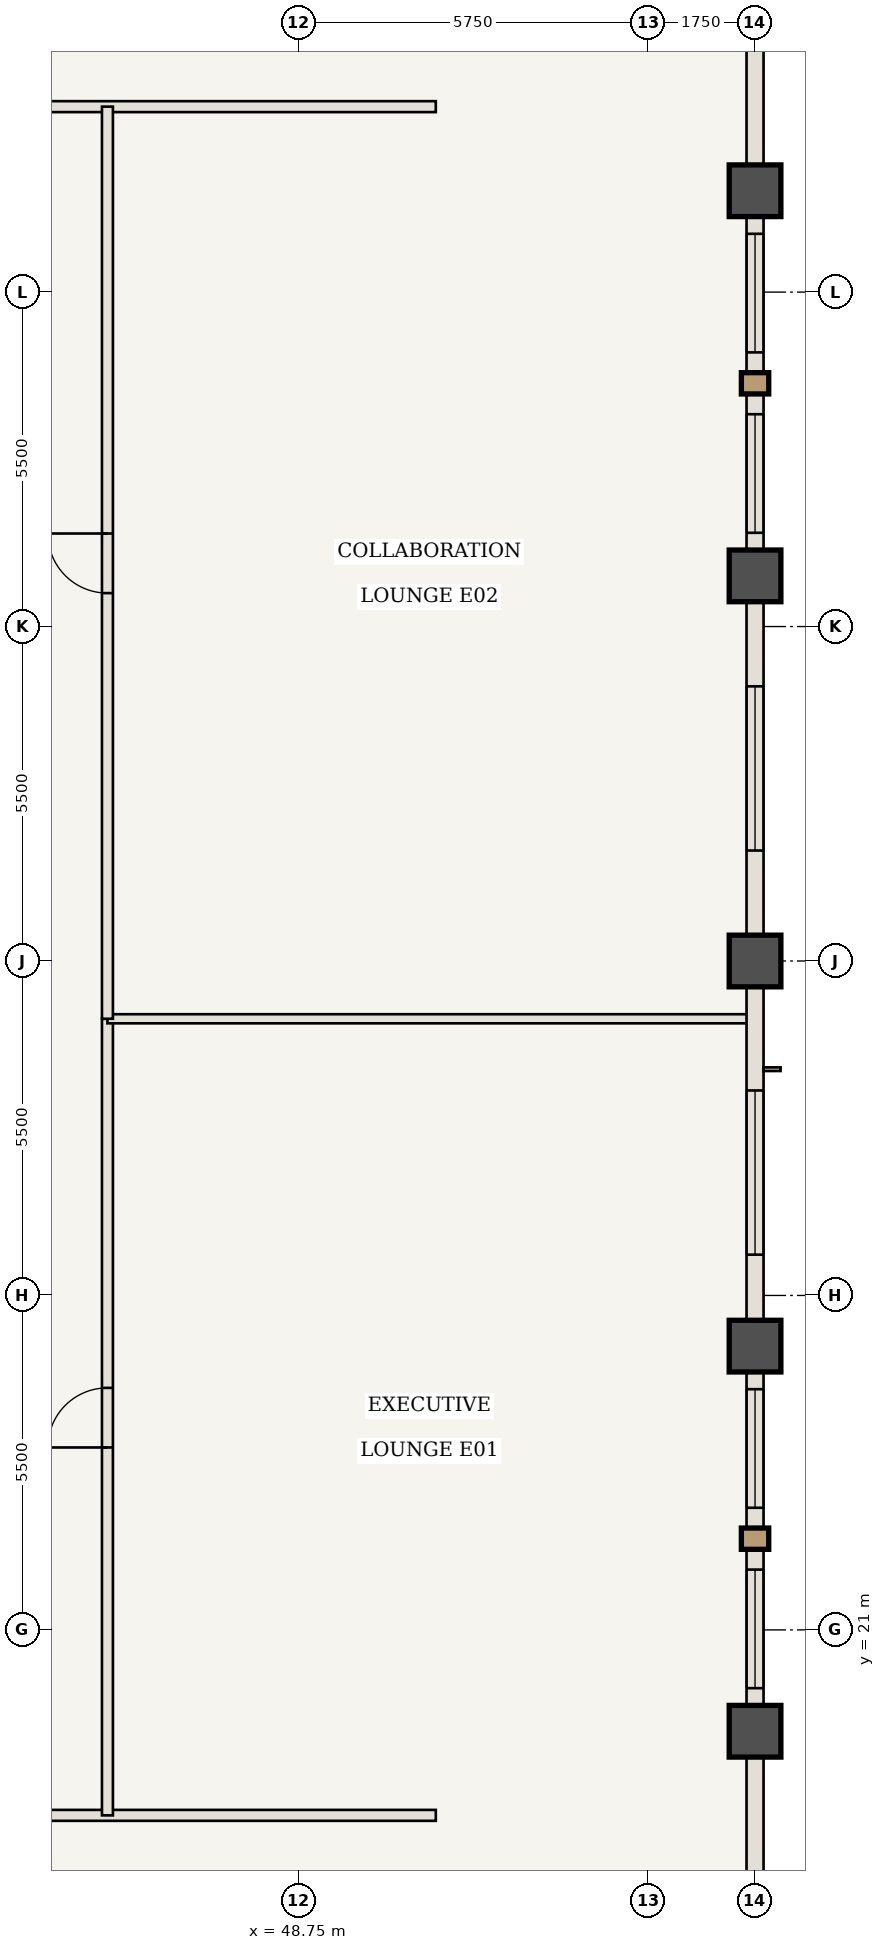
"""IFC4 building model, lengths in metres.
Left out: names, types, materials, properties, quantities, classifications, styles, units other than length and angle.
Written with IfcOpenShell. Run it as: python <this file> out.ifc"""

import sys

from ifc_helpers import new_model, si_unit, direction, frame, frame_2d, origin, origin_2d, place, context, subcontext, project, spatial, rectangle, extrude, element, fill, save


model = new_model("IFC4")
c1 = context("Model", 3, precision=1e-05, world=origin(), true_north=direction((0.0, 1.0)))
c2 = subcontext(c1, "Body", "Model", "MODEL_VIEW")
j1 = project(units=[si_unit("LENGTHUNIT", "METRE"), si_unit("PLANEANGLEUNIT", "RADIAN")], contexts=[c1])
p1 = place(None, origin())
s1 = spatial("IfcSite", under=j1, at=p1, CompositionType="ELEMENT")
p2 = place(p1, origin())
s2 = spatial("IfcBuilding", under=s1, at=p2, CompositionType="ELEMENT")
p3 = place(p2, frame((0.0, 0.0, 221.55)))
s3 = spatial("IfcBuildingStorey", under=s2, at=p3, CompositionType="ELEMENT", Elevation=221.55)
for number, where, z_axis, x_axis in (
    (1, (56.25, 19.333, 0.0), (0.0, 0.0, 1.0), (1.0, 0.0, 0.0)),
    (2, (56.25, 25.667, 0.0), (0.0, 0.0, 1.0), (1.0, 0.0, 0.0)),
    (3, (56.25, 32.0, 0.0), (0.0, 0.0, 1.0), (1.0, 0.0, 0.0)),
    (4, (56.25, 38.333, 0.0), (0.0, 0.0, 1.0), (1.0, 0.0, 0.0)),
    (5, (56.25, 44.667, 0.0), (0.0, 0.0, 1.0), (1.0, 0.0, 0.0)),
):
    element("IfcColumn", number, at=place(p3, frame(where, z_axis=z_axis, x_axis=x_axis)), inside=s3, PredefinedType="COLUMN", context=c2, shape_type="SweptSolid", body=[
        extrude(rectangle(XDim=0.85, YDim=0.85, at=origin_2d()), origin(), (0.0, 0.0, 1.0), 3.85),
    ])
p4 = place(p3, frame((39.258, 17.95, 0.0), z_axis=(0.0, 0.0, 1.0), x_axis=(1.0, 0.0, 0.0)))
e6 = element("IfcWall", 6, at=p4, inside=s3, PredefinedType="STANDARD", context=c2, shape_type="SweptSolid", body=[
    extrude(rectangle(XDim=11.742, YDim=0.18, at=frame_2d((5.871, 0.0))), origin(), (0.0, 0.0, 1.0), 3.685),
])
p5 = place(p4, frame((1.196, 0.0, 0.0)))
e7 = element("IfcOpeningElement", 7, at=p5, cuts=e6, PredefinedType="OPENING", context=c2, shape_type="SweptSolid", body=[
    extrude(rectangle(XDim=0.98, YDim=2.2, at=frame_2d((0.49, 1.1))), frame((0.0, 0.1, 0.0), z_axis=(0.0, -1.0, 0.0), x_axis=(1.0, 0.0, 0.0)), (0.0, 0.0, 1.0), 0.2),
])
p6 = place(p3, frame((13.0, 46.05, 0.0), z_axis=(0.0, 0.0, 1.0), x_axis=(1.0, 0.0, 0.0)))
e8 = element("IfcWall", 8, at=p6, inside=s3, PredefinedType="STANDARD", context=c2, shape_type="SweptSolid", body=[
    extrude(rectangle(XDim=38.0, YDim=0.18, at=frame_2d((19.0, 0.0))), origin(), (0.0, 0.0, 1.0), 3.685),
])
p7 = place(p6, frame((19.7, 0.0, 0.0)))
e9 = element("IfcOpeningElement", 9, at=p7, cuts=e8, PredefinedType="OPENING", context=c2, shape_type="SweptSolid", body=[
    extrude(rectangle(XDim=0.98, YDim=2.2, at=frame_2d((0.49, 1.1))), frame((0.0, 0.1, 0.0), z_axis=(0.0, -1.0, 0.0), x_axis=(1.0, 0.0, 0.0)), (0.0, 0.0, 1.0), 0.2),
])
p8 = place(p3, frame((45.6, 17.95, 0.0), z_axis=(0.0, 0.0, 1.0), x_axis=(0.0, 1.0, 0.0)))
e10 = element("IfcWall", 10, at=p8, inside=s3, PredefinedType="STANDARD", context=c2, shape_type="SweptSolid", body=[
    extrude(rectangle(XDim=13.1, YDim=0.18, at=frame_2d((6.55, 0.0))), origin(), (0.0, 0.0, 1.0), 3.685),
])
p9 = place(p8, frame((6.05, 0.0, 0.0)))
e11 = element("IfcOpeningElement", 11, at=p9, cuts=e10, PredefinedType="OPENING", context=c2, shape_type="SweptSolid", body=[
    extrude(rectangle(XDim=0.98, YDim=2.2, at=frame_2d((0.49, 1.1))), frame((0.0, 0.1, 0.0), z_axis=(0.0, -1.0, 0.0), x_axis=(1.0, 0.0, 0.0)), (0.0, 0.0, 1.0), 0.2),
])
p10 = place(p3, frame((45.6, 31.05, 0.0), z_axis=(0.0, 0.0, 1.0), x_axis=(1.0, 0.0, 0.0)))
e12 = element("IfcWall", 12, at=p10, inside=s3, PredefinedType="STANDARD", context=c2, shape_type="SweptSolid", body=[
    extrude(rectangle(XDim=10.59, YDim=0.15, at=frame_2d((5.295, 0.0))), origin(), (0.0, 0.0, 1.0), 3.685),
])
p11 = place(p3, frame((45.6, 31.05, 0.0), z_axis=(0.0, 0.0, 1.0), x_axis=(0.0, 1.0, 0.0)))
e13 = element("IfcWall", 13, at=p11, inside=s3, PredefinedType="STANDARD", context=c2, shape_type="SweptSolid", body=[
    extrude(rectangle(XDim=15.0, YDim=0.18, at=frame_2d((7.5, 0.0))), origin(), (0.0, 0.0, 1.0), 3.685),
])
p12 = place(p11, frame((7.0, 0.0, 0.0)))
e14 = element("IfcOpeningElement", 14, at=p12, cuts=e13, PredefinedType="OPENING", context=c2, shape_type="SweptSolid", body=[
    extrude(rectangle(XDim=0.98, YDim=2.2, at=frame_2d((0.49, 1.1))), frame((0.0, 0.1, 0.0), z_axis=(0.0, -1.0, 0.0), x_axis=(1.0, 0.0, 0.0)), (0.0, 0.0, 1.0), 0.2),
])
p13 = place(p3, frame((56.25, 19.333, 0.0), z_axis=(0.0, 0.0, 1.0), x_axis=(0.0, -1.0, 0.0)))
e15 = element("IfcWall", 15, at=p13, inside=s3, PredefinedType="USERDEFINED", context=c2, shape_type="SweptSolid", body=[
    extrude(rectangle(XDim=6.333, YDim=0.28, at=frame_2d((3.167, 0.0))), origin(), (0.0, 0.0, 1.0), 2.985),
])
p14 = place(p3, frame((56.25, 25.667, 0.0), z_axis=(0.0, 0.0, 1.0), x_axis=(0.0, -1.0, 0.0)))
e16 = element("IfcWall", 16, at=p14, inside=s3, PredefinedType="USERDEFINED", context=c2, shape_type="SweptSolid", body=[
    extrude(rectangle(XDim=6.333, YDim=0.28, at=frame_2d((3.167, 0.0))), origin(), (0.0, 0.0, 1.0), 2.985),
])
p15 = place(p14, frame((0.708, 0.0, 0.85)))
e17 = element("IfcOpeningElement", 17, at=p15, cuts=e16, PredefinedType="OPENING", context=c2, shape_type="SweptSolid", body=[
    extrude(rectangle(XDim=1.95, YDim=1.935, at=frame_2d((0.975, 0.968))), frame((0.0, 0.15, 0.0), z_axis=(0.0, -1.0, 0.0), x_axis=(1.0, 0.0, 0.0)), (0.0, 0.0, 1.0), 0.3),
])
p16 = place(p14, frame((3.675, 0.0, 0.85)))
e18 = element("IfcOpeningElement", 18, at=p16, cuts=e16, PredefinedType="OPENING", context=c2, shape_type="SweptSolid", body=[
    extrude(rectangle(XDim=1.95, YDim=1.935, at=frame_2d((0.975, 0.968))), frame((0.0, 0.15, 0.0), z_axis=(0.0, -1.0, 0.0), x_axis=(1.0, 0.0, 0.0)), (0.0, 0.0, 1.0), 0.3),
])
p17 = place(p3, frame((56.25, 32.0, 0.0), z_axis=(0.0, 0.0, 1.0), x_axis=(0.0, -1.0, 0.0)))
e19 = element("IfcWall", 19, at=p17, inside=s3, PredefinedType="USERDEFINED", context=c2, shape_type="SweptSolid", body=[
    extrude(rectangle(XDim=6.333, YDim=0.28, at=frame_2d((3.167, 0.0))), origin(), (0.0, 0.0, 1.0), 2.985),
])
p18 = place(p17, frame((2.129, 0.0, 0.85)))
e20 = element("IfcOpeningElement", 20, at=p18, cuts=e19, PredefinedType="OPENING", context=c2, shape_type="SweptSolid", body=[
    extrude(rectangle(XDim=2.7, YDim=1.935, at=frame_2d((1.35, 0.968))), frame((0.0, 0.15, 0.0), z_axis=(0.0, -1.0, 0.0), x_axis=(1.0, 0.0, 0.0)), (0.0, 0.0, 1.0), 0.3),
])
p19 = place(p3, frame((56.25, 38.333, 0.0), z_axis=(0.0, 0.0, 1.0), x_axis=(0.0, -1.0, 0.0)))
e21 = element("IfcWall", 21, at=p19, inside=s3, PredefinedType="USERDEFINED", context=c2, shape_type="SweptSolid", body=[
    extrude(rectangle(XDim=6.333, YDim=0.28, at=frame_2d((3.167, 0.0))), origin(), (0.0, 0.0, 1.0), 2.985),
])
p20 = place(p19, frame((1.817, 0.0, 0.85)))
e22 = element("IfcOpeningElement", 22, at=p20, cuts=e21, PredefinedType="OPENING", context=c2, shape_type="SweptSolid", body=[
    extrude(rectangle(XDim=2.7, YDim=1.935, at=frame_2d((1.35, 0.968))), frame((0.0, 0.15, 0.0), z_axis=(0.0, -1.0, 0.0), x_axis=(1.0, 0.0, 0.0)), (0.0, 0.0, 1.0), 0.3),
])
p21 = place(p3, frame((56.25, 44.667, 0.0), z_axis=(0.0, 0.0, 1.0), x_axis=(0.0, -1.0, 0.0)))
e23 = element("IfcWall", 23, at=p21, inside=s3, PredefinedType="USERDEFINED", context=c2, shape_type="SweptSolid", body=[
    extrude(rectangle(XDim=6.333, YDim=0.28, at=frame_2d((3.167, 0.0))), origin(), (0.0, 0.0, 1.0), 2.985),
])
p22 = place(p21, frame((0.708, 0.0, 0.85)))
e24 = element("IfcOpeningElement", 24, at=p22, cuts=e23, PredefinedType="OPENING", context=c2, shape_type="SweptSolid", body=[
    extrude(rectangle(XDim=1.95, YDim=1.935, at=frame_2d((0.975, 0.968))), frame((0.0, 0.15, 0.0), z_axis=(0.0, -1.0, 0.0), x_axis=(1.0, 0.0, 0.0)), (0.0, 0.0, 1.0), 0.3),
])
p23 = place(p21, frame((3.675, 0.0, 0.85)))
e25 = element("IfcOpeningElement", 25, at=p23, cuts=e23, PredefinedType="OPENING", context=c2, shape_type="SweptSolid", body=[
    extrude(rectangle(XDim=1.95, YDim=1.935, at=frame_2d((0.975, 0.968))), frame((0.0, 0.15, 0.0), z_axis=(0.0, -1.0, 0.0), x_axis=(1.0, 0.0, 0.0)), (0.0, 0.0, 1.0), 0.3),
])
p24 = place(p3, frame((56.25, 51.0, 0.0), z_axis=(0.0, 0.0, 1.0), x_axis=(0.0, -1.0, 0.0)))
e26 = element("IfcWall", 26, at=p24, inside=s3, PredefinedType="USERDEFINED", context=c2, shape_type="SweptSolid", body=[
    extrude(rectangle(XDim=6.333, YDim=0.28, at=frame_2d((3.167, 0.0))), origin(), (0.0, 0.0, 1.0), 2.985),
])
p25 = place(p9, origin())
e27 = element("IfcDoor", 27, at=p25, inside=s3, OperationType="SINGLE_SWING_LEFT", PredefinedType="DOOR", context=c2, shape_type="SweptSolid", body=[
    extrude(rectangle(XDim=0.98, YDim=2.2, at=frame_2d((0.49, 1.1))), frame((0.0, 0.025, 0.0), z_axis=(0.0, -1.0, 0.0), x_axis=(1.0, 0.0, 0.0)), (0.0, 0.0, 1.0), 0.05),
])
fill(e11, e27)
p26 = place(p12, origin())
e28 = element("IfcDoor", 28, at=p26, inside=s3, OperationType="SINGLE_SWING_RIGHT", PredefinedType="DOOR", context=c2, shape_type="SweptSolid", body=[
    extrude(rectangle(XDim=0.98, YDim=2.2, at=frame_2d((0.49, 1.1))), frame((0.0, 0.025, 0.0), z_axis=(0.0, -1.0, 0.0), x_axis=(1.0, 0.0, 0.0)), (0.0, 0.0, 1.0), 0.05),
])
fill(e14, e28)
p27 = place(p15, origin())
e29 = element("IfcWindow", 29, at=p27, inside=s3, PartitioningType="SINGLE_PANEL", PredefinedType="WINDOW", context=c2, shape_type="SweptSolid", body=[
    extrude(rectangle(XDim=1.95, YDim=1.935, at=frame_2d((0.975, 0.968))), frame((0.0, 0.03, 0.0), z_axis=(0.0, -1.0, 0.0), x_axis=(1.0, 0.0, 0.0)), (0.0, 0.0, 1.0), 0.06),
])
fill(e17, e29)
p28 = place(p16, origin())
e30 = element("IfcWindow", 30, at=p28, inside=s3, PartitioningType="SINGLE_PANEL", PredefinedType="WINDOW", context=c2, shape_type="SweptSolid", body=[
    extrude(rectangle(XDim=1.95, YDim=1.935, at=frame_2d((0.975, 0.968))), frame((0.0, 0.03, 0.0), z_axis=(0.0, -1.0, 0.0), x_axis=(1.0, 0.0, 0.0)), (0.0, 0.0, 1.0), 0.06),
])
fill(e18, e30)
p29 = place(p18, origin())
e31 = element("IfcWindow", 31, at=p29, inside=s3, PartitioningType="SINGLE_PANEL", PredefinedType="WINDOW", context=c2, shape_type="SweptSolid", body=[
    extrude(rectangle(XDim=2.7, YDim=1.935, at=frame_2d((1.35, 0.968))), frame((0.0, 0.03, 0.0), z_axis=(0.0, -1.0, 0.0), x_axis=(1.0, 0.0, 0.0)), (0.0, 0.0, 1.0), 0.06),
])
fill(e20, e31)
p30 = place(p20, origin())
e32 = element("IfcWindow", 32, at=p30, inside=s3, PartitioningType="SINGLE_PANEL", PredefinedType="WINDOW", context=c2, shape_type="SweptSolid", body=[
    extrude(rectangle(XDim=2.7, YDim=1.935, at=frame_2d((1.35, 0.968))), frame((0.0, 0.03, 0.0), z_axis=(0.0, -1.0, 0.0), x_axis=(1.0, 0.0, 0.0)), (0.0, 0.0, 1.0), 0.06),
])
fill(e22, e32)
p31 = place(p22, origin())
e33 = element("IfcWindow", 33, at=p31, inside=s3, PartitioningType="SINGLE_PANEL", PredefinedType="WINDOW", context=c2, shape_type="SweptSolid", body=[
    extrude(rectangle(XDim=1.95, YDim=1.935, at=frame_2d((0.975, 0.968))), frame((0.0, 0.03, 0.0), z_axis=(0.0, -1.0, 0.0), x_axis=(1.0, 0.0, 0.0)), (0.0, 0.0, 1.0), 0.06),
])
fill(e24, e33)
p32 = place(p23, origin())
e34 = element("IfcWindow", 34, at=p32, inside=s3, PartitioningType="SINGLE_PANEL", PredefinedType="WINDOW", context=c2, shape_type="SweptSolid", body=[
    extrude(rectangle(XDim=1.95, YDim=1.935, at=frame_2d((0.975, 0.968))), frame((0.0, 0.03, 0.0), z_axis=(0.0, -1.0, 0.0), x_axis=(1.0, 0.0, 0.0)), (0.0, 0.0, 1.0), 0.06),
])
fill(e25, e34)
save(model, sys.argv[1])
